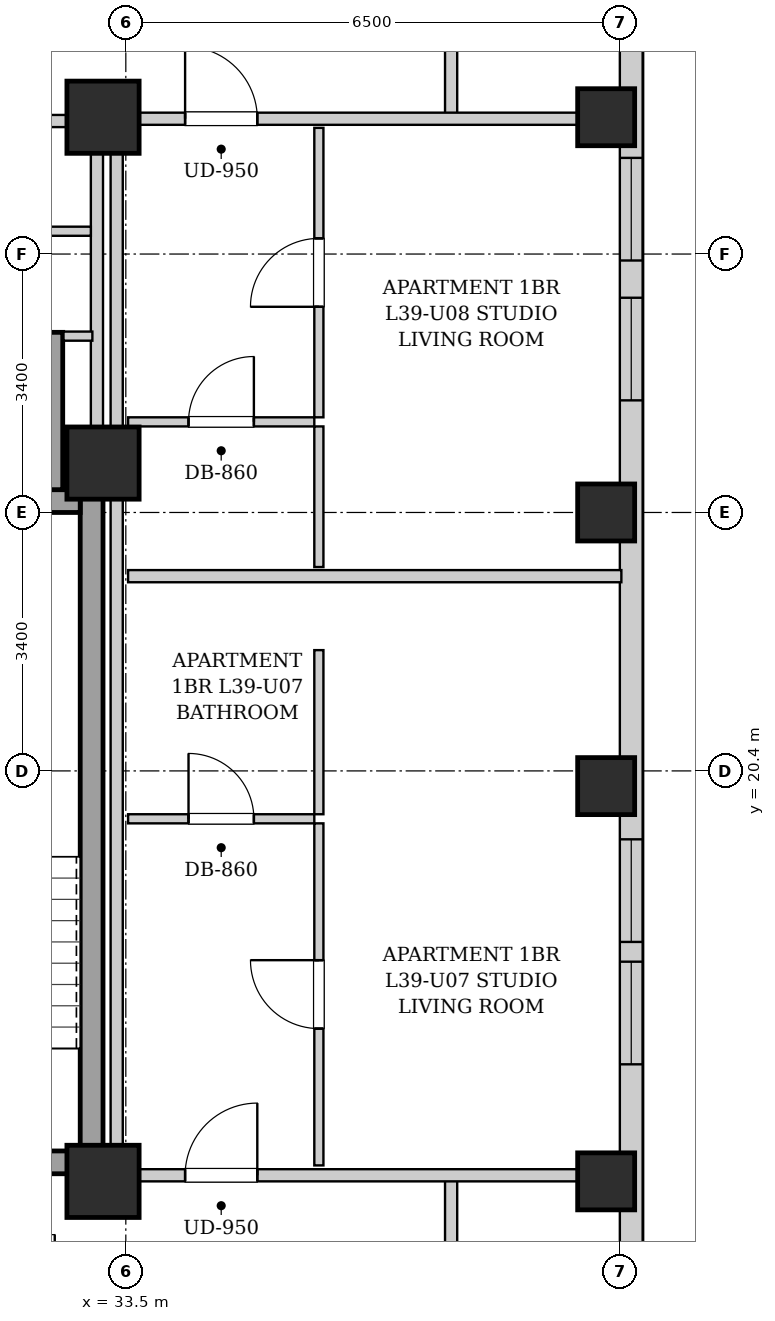
"""IFC4 building model, lengths in metres.
Left out: names, types, materials, properties, quantities, classifications, styles, units other than length and angle.
Written with IfcOpenShell. Run it as: python <this file> out.ifc"""

import sys

from ifc_helpers import new_model, si_unit, direction, frame, frame_2d, origin, origin_2d, place, context, subcontext, project, spatial, rectangle, extrude, element, fill, save


model = new_model("IFC4")
c1 = context("Model", 3, precision=1e-05, world=origin(), true_north=direction((0.0, 1.0)))
c2 = subcontext(c1, "Body", "Model", "MODEL_VIEW")
j1 = project(units=[si_unit("LENGTHUNIT", "METRE"), si_unit("PLANEANGLEUNIT", "RADIAN")], contexts=[c1])
p1 = place(None, origin())
s1 = spatial("IfcSite", under=j1, at=p1, CompositionType="ELEMENT")
p2 = place(p1, origin())
s2 = spatial("IfcBuilding", under=s1, at=p2, CompositionType="ELEMENT")
p3 = place(p2, frame((0.0, 0.0, 137.4)))
s3 = spatial("IfcBuildingStorey", under=s2, at=p3, CompositionType="ELEMENT", Elevation=137.4)
for number, where, z_axis, x_axis in (
    (1, (39.82, 15.0, 0.0), (0.0, 0.0, 1.0), (1.0, 0.0, 0.0)),
    (2, (39.82, 20.2, 0.0), (0.0, 0.0, 1.0), (1.0, 0.0, 0.0)),
    (3, (39.82, 23.8, 0.0), (0.0, 0.0, 1.0), (1.0, 0.0, 0.0)),
    (4, (39.82, 29.0, 0.0), (0.0, 0.0, 1.0), (1.0, 0.0, 0.0)),
):
    element("IfcColumn", number, at=place(p3, frame(where, z_axis=z_axis, x_axis=x_axis)), inside=s3, PredefinedType="COLUMN", context=c2, shape_type="SweptSolid", body=[
        extrude(rectangle(XDim=0.75, YDim=0.75, at=origin_2d()), origin(), (0.0, 0.0, 1.0), 3.25),
    ])
for number, where, z_axis, x_axis in (
    (5, (33.2, 15.0, 0.0), (0.0, 0.0, 1.0), (1.0, 0.0, 0.0)),
    (6, (33.2, 29.0, 0.0), (0.0, 0.0, 1.0), (1.0, 0.0, 0.0)),
    (7, (33.2, 24.45, 0.0), (0.0, 0.0, 1.0), (1.0, 0.0, 0.0)),
):
    element("IfcColumn", number, at=place(p3, frame(where, z_axis=z_axis, x_axis=x_axis)), inside=s3, PredefinedType="COLUMN", context=c2, shape_type="SweptSolid", body=[
        extrude(rectangle(XDim=0.95, YDim=0.95, at=origin_2d()), origin(), (0.0, 0.0, 1.0), 3.25),
    ])
p4 = place(p3, frame((40.15, 40.8, 0.0), z_axis=(0.0, 0.0, 1.0), x_axis=(0.0, -1.0, 0.0)))
e8 = element("IfcWall", 8, at=p4, inside=s3, PredefinedType="SOLIDWALL", context=c2, shape_type="SweptSolid", body=[
    extrude(rectangle(XDim=34.5, YDim=0.3, at=frame_2d((17.25, 0.0))), origin(), (0.0, 0.0, 1.0), 2.99),
])
p5 = place(p4, frame((31.725, 0.0, 0.55)))
e9 = element("IfcOpeningElement", 9, at=p5, cuts=e8, PredefinedType="OPENING", context=c2, shape_type="SweptSolid", body=[
    extrude(rectangle(XDim=1.35, YDim=1.2, at=frame_2d((0.675, 0.6))), frame((0.0, 0.16, 0.0), z_axis=(0.0, -1.0, 0.0), x_axis=(1.0, 0.0, 0.0)), (0.0, 0.0, 1.0), 0.32),
])
p6 = place(p4, frame((3.0, 0.0, 0.55)))
e10 = element("IfcOpeningElement", 10, at=p6, cuts=e8, PredefinedType="OPENING", context=c2, shape_type="SweptSolid", body=[
    extrude(rectangle(XDim=1.35, YDim=1.2, at=frame_2d((0.675, 0.6))), frame((0.0, 0.16, 0.0), z_axis=(0.0, -1.0, 0.0), x_axis=(1.0, 0.0, 0.0)), (0.0, 0.0, 1.0), 0.32),
])
p7 = place(p4, frame((1.085, 0.0, 0.55)))
e11 = element("IfcOpeningElement", 11, at=p7, cuts=e8, PredefinedType="OPENING", context=c2, shape_type="SweptSolid", body=[
    extrude(rectangle(XDim=1.35, YDim=1.2, at=frame_2d((0.675, 0.6))), frame((0.0, 0.16, 0.0), z_axis=(0.0, -1.0, 0.0), x_axis=(1.0, 0.0, 0.0)), (0.0, 0.0, 1.0), 0.32),
])
p8 = place(p4, frame((21.3, 0.0, 0.55)))
e12 = element("IfcOpeningElement", 12, at=p8, cuts=e8, PredefinedType="OPENING", context=c2, shape_type="SweptSolid", body=[
    extrude(rectangle(XDim=1.35, YDim=1.2, at=frame_2d((0.675, 0.6))), frame((0.0, 0.16, 0.0), z_axis=(0.0, -1.0, 0.0), x_axis=(1.0, 0.0, 0.0)), (0.0, 0.0, 1.0), 0.32),
])
p9 = place(p4, frame((22.91, 0.0, 0.55)))
e13 = element("IfcOpeningElement", 13, at=p9, cuts=e8, PredefinedType="OPENING", context=c2, shape_type="SweptSolid", body=[
    extrude(rectangle(XDim=1.35, YDim=1.2, at=frame_2d((0.675, 0.6))), frame((0.0, 0.16, 0.0), z_axis=(0.0, -1.0, 0.0), x_axis=(1.0, 0.0, 0.0)), (0.0, 0.0, 1.0), 0.32),
])
p10 = place(p4, frame((14.175, 0.0, 0.55)))
e14 = element("IfcOpeningElement", 14, at=p10, cuts=e8, PredefinedType="OPENING", context=c2, shape_type="SweptSolid", body=[
    extrude(rectangle(XDim=1.35, YDim=1.2, at=frame_2d((0.675, 0.6))), frame((0.0, 0.16, 0.0), z_axis=(0.0, -1.0, 0.0), x_axis=(1.0, 0.0, 0.0)), (0.0, 0.0, 1.0), 0.32),
])
p11 = place(p4, frame((12.335, 0.0, 0.55)))
e15 = element("IfcOpeningElement", 15, at=p11, cuts=e8, PredefinedType="OPENING", context=c2, shape_type="SweptSolid", body=[
    extrude(rectangle(XDim=1.35, YDim=1.2, at=frame_2d((0.675, 0.6))), frame((0.0, 0.16, 0.0), z_axis=(0.0, -1.0, 0.0), x_axis=(1.0, 0.0, 0.0)), (0.0, 0.0, 1.0), 0.32),
])
p12 = place(p3, frame((33.05, 15.1, 0.0), z_axis=(0.0, 0.0, 1.0), x_axis=(0.0, 1.0, 0.0)))
e16 = element("IfcWall", 16, at=p12, inside=s3, PredefinedType="SHEAR", context=c2, shape_type="SweptSolid", body=[
    extrude(rectangle(XDim=9.0, YDim=0.3, at=frame_2d((4.5, 0.0))), origin(), (0.0, 0.0, 1.0), 2.99),
])
p13 = place(p3, frame((30.05, 23.95, 0.0), z_axis=(0.0, 0.0, 1.0), x_axis=(1.0, 0.0, 0.0)))
e17 = element("IfcWall", 17, at=p13, inside=s3, PredefinedType="SHEAR", context=c2, shape_type="SweptSolid", body=[
    extrude(rectangle(XDim=2.85, YDim=0.3, at=frame_2d((1.425, 0.0))), origin(), (0.0, 0.0, 1.0), 2.99),
])
p14 = place(p3, frame((30.05, 15.25, 0.0), z_axis=(0.0, 0.0, 1.0), x_axis=(1.0, 0.0, 0.0)))
e18 = element("IfcWall", 18, at=p14, inside=s3, PredefinedType="SHEAR", context=c2, shape_type="SweptSolid", body=[
    extrude(rectangle(XDim=2.85, YDim=0.3, at=frame_2d((1.425, 0.0))), origin(), (0.0, 0.0, 1.0), 2.99),
])
p15 = place(p14, frame((0.86, 0.0, 0.0)))
e19 = element("IfcOpeningElement", 19, at=p15, cuts=e18, PredefinedType="OPENING", context=c2, shape_type="SweptSolid", body=[
    extrude(rectangle(XDim=1.1, YDim=2.05, at=frame_2d((0.55, 1.025))), frame((0.0, 0.16, 0.0), z_axis=(0.0, -1.0, 0.0), x_axis=(1.0, 0.0, 0.0)), (0.0, 0.0, 1.0), 0.32),
])
p16 = place(p3, frame((32.56, 24.1, 0.0), z_axis=(0.0, 0.0, 1.0), x_axis=(0.0, 1.0, 0.0)))
e20 = element("IfcWall", 20, at=p16, inside=s3, PredefinedType="SHEAR", context=c2, shape_type="SweptSolid", body=[
    extrude(rectangle(XDim=2.07, YDim=0.22, at=frame_2d((1.035, 0.0))), origin(), (0.0, 0.0, 1.0), 2.99),
])
p17 = place(p3, frame((33.12, 24.12, 0.0), z_axis=(0.0, 0.0, 1.0), x_axis=(0.0, 1.0, 0.0)))
e21 = element("IfcWall", 21, at=p17, inside=s3, PredefinedType="PARTITIONING", context=c2, shape_type="SweptSolid", body=[
    extrude(rectangle(XDim=4.76, YDim=0.16, at=frame_2d((2.38, 0.0))), origin(), (0.0, 0.0, 1.0), 2.325),
])
p18 = place(p3, frame((32.68, 26.12, 0.0), z_axis=(0.0, 0.0, 1.0), x_axis=(1.0, 0.0, 0.0)))
e22 = element("IfcWall", 22, at=p18, inside=s3, PredefinedType="PARTITIONING", context=c2, shape_type="SweptSolid", body=[
    extrude(rectangle(XDim=0.38, YDim=0.12, at=frame_2d((0.19, 0.0))), origin(), (0.0, 0.0, 1.0), 2.99),
])
p19 = place(p3, frame((30.12, 27.5, 0.0), z_axis=(0.0, 0.0, 1.0), x_axis=(1.0, 0.0, 0.0)))
e23 = element("IfcWall", 23, at=p19, inside=s3, PredefinedType="PARTITIONING", context=c2, shape_type="SweptSolid", body=[
    extrude(rectangle(XDim=2.92, YDim=0.12, at=frame_2d((1.46, 0.0))), origin(), (0.0, 0.0, 1.0), 2.99),
])
p20 = place(p19, frame((0.97, 0.0, 0.0)))
e24 = element("IfcOpeningElement", 24, at=p20, cuts=e23, PredefinedType="OPENING", context=c2, shape_type="SweptSolid", body=[
    extrude(rectangle(XDim=0.86, YDim=2.05, at=frame_2d((0.43, 1.025))), frame((0.0, 0.07, 0.0), z_axis=(0.0, -1.0, 0.0), x_axis=(1.0, 0.0, 0.0)), (0.0, 0.0, 1.0), 0.14),
])
p21 = place(p3, frame((25.72, 28.95, 0.0), z_axis=(0.0, 0.0, 1.0), x_axis=(1.0, 0.0, 0.0)))
e25 = element("IfcWall", 25, at=p21, inside=s3, PredefinedType="PARTITIONING", context=c2, shape_type="SweptSolid", body=[
    extrude(rectangle(XDim=7.32, YDim=0.16, at=frame_2d((3.66, 0.0))), origin(), (0.0, 0.0, 1.0), 2.426),
])
p22 = place(p21, frame((1.27, 0.0, 0.0)))
e26 = element("IfcOpeningElement", 26, at=p22, cuts=e25, PredefinedType="OPENING", context=c2, shape_type="SweptSolid", body=[
    extrude(rectangle(XDim=0.86, YDim=2.05, at=frame_2d((0.43, 1.025))), frame((0.0, 0.09, 0.0), z_axis=(0.0, -1.0, 0.0), x_axis=(1.0, 0.0, 0.0)), (0.0, 0.0, 1.0), 0.18),
])
for number, where, z_axis, x_axis in (
    (27, (37.78, 13.35, 0.0), (0.0, 0.0, 1.0), (0.0, 1.0, 0.0)),
    (28, (37.78, 28.98, 0.0), (0.0, 0.0, 1.0), (0.0, 1.0, 0.0)),
):
    element("IfcWall", number, at=place(p3, frame(where, z_axis=z_axis, x_axis=x_axis)), inside=s3, PredefinedType="PARTITIONING", context=c2, shape_type="SweptSolid", body=[
        extrude(rectangle(XDim=1.74, YDim=0.16, at=frame_2d((0.87, 0.0))), origin(), (0.0, 0.0, 1.0), 2.99),
    ])
p23 = place(p3, frame((33.38, 15.08, 0.0), z_axis=(0.0, 0.0, 1.0), x_axis=(1.0, 0.0, 0.0)))
e29 = element("IfcWall", 29, at=p23, inside=s3, PredefinedType="PARTITIONING", context=c2, shape_type="SweptSolid", body=[
    extrude(rectangle(XDim=6.64, YDim=0.16, at=frame_2d((3.32, 0.0))), origin(), (0.0, 0.0, 1.0), 2.426),
])
p24 = place(p23, frame((0.9, 0.0, 0.0)))
e30 = element("IfcOpeningElement", 30, at=p24, cuts=e29, PredefinedType="OPENING", context=c2, shape_type="SweptSolid", body=[
    extrude(rectangle(XDim=0.95, YDim=2.1, at=frame_2d((0.475, 1.05))), frame((0.0, 0.09, 0.0), z_axis=(0.0, -1.0, 0.0), x_axis=(1.0, 0.0, 0.0)), (0.0, 0.0, 1.0), 0.18),
])
p25 = place(p3, frame((33.53, 22.962, 0.0), z_axis=(0.0, 0.0, 1.0), x_axis=(1.0, 0.0, 0.0)))
e31 = element("IfcWall", 31, at=p25, inside=s3, PredefinedType="PARTITIONING", context=c2, shape_type="SweptSolid", body=[
    extrude(rectangle(XDim=6.49, YDim=0.16, at=frame_2d((3.245, 0.0))), origin(), (0.0, 0.0, 1.0), 2.99),
])
p26 = place(p3, frame((33.53, 19.77, 0.0), z_axis=(0.0, 0.0, 1.0), x_axis=(1.0, 0.0, 0.0)))
e32 = element("IfcWall", 32, at=p26, inside=s3, PredefinedType="PARTITIONING", context=c2, shape_type="SweptSolid", body=[
    extrude(rectangle(XDim=2.45, YDim=0.12, at=frame_2d((1.225, 0.0))), origin(), (0.0, 0.0, 1.0), 2.99),
])
p27 = place(p26, frame((0.795, 0.0, 0.0)))
e33 = element("IfcOpeningElement", 33, at=p27, cuts=e32, PredefinedType="OPENING", context=c2, shape_type="SweptSolid", body=[
    extrude(rectangle(XDim=0.86, YDim=2.05, at=frame_2d((0.43, 1.025))), frame((0.0, 0.07, 0.0), z_axis=(0.0, -1.0, 0.0), x_axis=(1.0, 0.0, 0.0)), (0.0, 0.0, 1.0), 0.14),
])
p28 = place(p3, frame((36.04, 19.83, 0.0), z_axis=(0.0, 0.0, 1.0), x_axis=(0.0, 1.0, 0.0)))
e34 = element("IfcWall", 34, at=p28, inside=s3, PredefinedType="PARTITIONING", context=c2, shape_type="SweptSolid", body=[
    extrude(rectangle(XDim=2.159, YDim=0.12, at=frame_2d((1.08, 0.0))), origin(), (0.0, 0.0, 1.0), 2.99),
])
p29 = place(p3, frame((36.04, 15.21, 0.0), z_axis=(0.0, 0.0, 1.0), x_axis=(0.0, 1.0, 0.0)))
e35 = element("IfcWall", 35, at=p29, inside=s3, PredefinedType="PARTITIONING", context=c2, shape_type="SweptSolid", body=[
    extrude(rectangle(XDim=4.5, YDim=0.12, at=frame_2d((2.25, 0.0))), origin(), (0.0, 0.0, 1.0), 2.99),
])
p30 = place(p29, frame((1.8, 0.0, 0.0)))
e36 = element("IfcOpeningElement", 36, at=p30, cuts=e35, PredefinedType="OPENING", context=c2, shape_type="SweptSolid", body=[
    extrude(rectangle(XDim=0.9, YDim=2.05, at=frame_2d((0.45, 1.025))), frame((0.0, 0.07, 0.0), z_axis=(0.0, -1.0, 0.0), x_axis=(1.0, 0.0, 0.0)), (0.0, 0.0, 1.0), 0.14),
])
p31 = place(p3, frame((33.38, 28.98, 0.0), z_axis=(0.0, 0.0, 1.0), x_axis=(1.0, 0.0, 0.0)))
e37 = element("IfcWall", 37, at=p31, inside=s3, PredefinedType="PARTITIONING", context=c2, shape_type="SweptSolid", body=[
    extrude(rectangle(XDim=6.64, YDim=0.16, at=frame_2d((3.32, 0.0))), origin(), (0.0, 0.0, 1.0), 2.426),
])
p32 = place(p31, frame((0.9, 0.0, 0.0)))
e38 = element("IfcOpeningElement", 38, at=p32, cuts=e37, PredefinedType="OPENING", context=c2, shape_type="SweptSolid", body=[
    extrude(rectangle(XDim=0.95, YDim=2.1, at=frame_2d((0.475, 1.05))), frame((0.0, 0.09, 0.0), z_axis=(0.0, -1.0, 0.0), x_axis=(1.0, 0.0, 0.0)), (0.0, 0.0, 1.0), 0.18),
])
p33 = place(p3, frame((33.53, 24.992, 0.0), z_axis=(0.0, 0.0, 1.0), x_axis=(1.0, 0.0, 0.0)))
e39 = element("IfcWall", 39, at=p33, inside=s3, PredefinedType="PARTITIONING", context=c2, shape_type="SweptSolid", body=[
    extrude(rectangle(XDim=2.45, YDim=0.12, at=frame_2d((1.225, 0.0))), origin(), (0.0, 0.0, 1.0), 2.99),
])
p34 = place(p33, frame((0.795, 0.0, 0.0)))
e40 = element("IfcOpeningElement", 40, at=p34, cuts=e39, PredefinedType="OPENING", context=c2, shape_type="SweptSolid", body=[
    extrude(rectangle(XDim=0.86, YDim=2.05, at=frame_2d((0.43, 1.025))), frame((0.0, 0.07, 0.0), z_axis=(0.0, -1.0, 0.0), x_axis=(1.0, 0.0, 0.0)), (0.0, 0.0, 1.0), 0.14),
])
p35 = place(p3, frame((36.04, 23.082, 0.0), z_axis=(0.0, 0.0, 1.0), x_axis=(0.0, 1.0, 0.0)))
e41 = element("IfcWall", 41, at=p35, inside=s3, PredefinedType="PARTITIONING", context=c2, shape_type="SweptSolid", body=[
    extrude(rectangle(XDim=1.85, YDim=0.12, at=frame_2d((0.925, 0.0))), origin(), (0.0, 0.0, 1.0), 2.99),
])
p36 = place(p3, frame((36.04, 25.052, 0.0), z_axis=(0.0, 0.0, 1.0), x_axis=(0.0, 1.0, 0.0)))
e42 = element("IfcWall", 42, at=p36, inside=s3, PredefinedType="PARTITIONING", context=c2, shape_type="SweptSolid", body=[
    extrude(rectangle(XDim=3.808, YDim=0.12, at=frame_2d((1.904, 0.0))), origin(), (0.0, 0.0, 1.0), 2.99),
])
p37 = place(p36, frame((1.454, 0.0, 0.0)))
e43 = element("IfcOpeningElement", 43, at=p37, cuts=e42, PredefinedType="OPENING", context=c2, shape_type="SweptSolid", body=[
    extrude(rectangle(XDim=0.9, YDim=2.05, at=frame_2d((0.45, 1.025))), frame((0.0, 0.07, 0.0), z_axis=(0.0, -1.0, 0.0), x_axis=(1.0, 0.0, 0.0)), (0.0, 0.0, 1.0), 0.14),
])
p38 = place(p3, frame((33.38, 15.02, 0.0), z_axis=(0.0, 0.0, 1.0), x_axis=(0.0, 1.0, 0.0)))
e44 = element("IfcWall", 44, at=p38, inside=s3, PredefinedType="PARTITIONING", context=c2, shape_type="SweptSolid", body=[
    extrude(rectangle(XDim=13.98, YDim=0.16, at=frame_2d((6.99, 0.0))), origin(), (0.0, 0.0, 1.0), 2.325),
])
p39 = place(p24, origin())
e45 = element("IfcDoor", 45, at=p39, inside=s3, OperationType="SINGLE_SWING_RIGHT", PredefinedType="DOOR", context=c2, shape_type="SweptSolid", body=[
    extrude(rectangle(XDim=0.95, YDim=2.1, at=frame_2d((0.475, 1.05))), frame((0.0, 0.025, 0.0), z_axis=(0.0, -1.0, 0.0), x_axis=(1.0, 0.0, 0.0)), (0.0, 0.0, 1.0), 0.05),
])
fill(e30, e45)
p40 = place(p27, origin())
e46 = element("IfcDoor", 46, at=p40, inside=s3, OperationType="SINGLE_SWING_LEFT", PredefinedType="DOOR", context=c2, shape_type="SweptSolid", body=[
    extrude(rectangle(XDim=0.86, YDim=2.05, at=frame_2d((0.43, 1.025))), frame((0.0, 0.025, 0.0), z_axis=(0.0, -1.0, 0.0), x_axis=(1.0, 0.0, 0.0)), (0.0, 0.0, 1.0), 0.05),
])
fill(e33, e46)
p41 = place(p30, origin())
e47 = element("IfcDoor", 47, at=p41, inside=s3, OperationType="SINGLE_SWING_RIGHT", PredefinedType="DOOR", context=c2, shape_type="SweptSolid", body=[
    extrude(rectangle(XDim=0.9, YDim=2.05, at=frame_2d((0.45, 1.025))), frame((0.0, 0.025, 0.0), z_axis=(0.0, -1.0, 0.0), x_axis=(1.0, 0.0, 0.0)), (0.0, 0.0, 1.0), 0.05),
])
fill(e36, e47)
p42 = place(p32, origin())
e48 = element("IfcDoor", 48, at=p42, inside=s3, OperationType="SINGLE_SWING_LEFT", PredefinedType="DOOR", context=c2, shape_type="SweptSolid", body=[
    extrude(rectangle(XDim=0.95, YDim=2.1, at=frame_2d((0.475, 1.05))), frame((0.0, 0.025, 0.0), z_axis=(0.0, -1.0, 0.0), x_axis=(1.0, 0.0, 0.0)), (0.0, 0.0, 1.0), 0.05),
])
fill(e38, e48)
p43 = place(p34, origin())
e49 = element("IfcDoor", 49, at=p43, inside=s3, OperationType="SINGLE_SWING_RIGHT", PredefinedType="DOOR", context=c2, shape_type="SweptSolid", body=[
    extrude(rectangle(XDim=0.86, YDim=2.05, at=frame_2d((0.43, 1.025))), frame((0.0, 0.025, 0.0), z_axis=(0.0, -1.0, 0.0), x_axis=(1.0, 0.0, 0.0)), (0.0, 0.0, 1.0), 0.05),
])
fill(e40, e49)
p44 = place(p37, origin())
e50 = element("IfcDoor", 50, at=p44, inside=s3, OperationType="SINGLE_SWING_LEFT", PredefinedType="DOOR", context=c2, shape_type="SweptSolid", body=[
    extrude(rectangle(XDim=0.9, YDim=2.05, at=frame_2d((0.45, 1.025))), frame((0.0, 0.025, 0.0), z_axis=(0.0, -1.0, 0.0), x_axis=(1.0, 0.0, 0.0)), (0.0, 0.0, 1.0), 0.05),
])
fill(e43, e50)
p45 = place(p8, origin())
e51 = element("IfcWindow", 51, at=p45, inside=s3, PartitioningType="SINGLE_PANEL", PredefinedType="WINDOW", context=c2, shape_type="SweptSolid", body=[
    extrude(rectangle(XDim=1.35, YDim=1.2, at=frame_2d((0.675, 0.6))), frame((0.0, 0.03, 0.0), z_axis=(0.0, -1.0, 0.0), x_axis=(1.0, 0.0, 0.0)), (0.0, 0.0, 1.0), 0.06),
])
fill(e12, e51)
p46 = place(p9, origin())
e52 = element("IfcWindow", 52, at=p46, inside=s3, PartitioningType="SINGLE_PANEL", PredefinedType="WINDOW", context=c2, shape_type="SweptSolid", body=[
    extrude(rectangle(XDim=1.35, YDim=1.2, at=frame_2d((0.675, 0.6))), frame((0.0, 0.03, 0.0), z_axis=(0.0, -1.0, 0.0), x_axis=(1.0, 0.0, 0.0)), (0.0, 0.0, 1.0), 0.06),
])
fill(e13, e52)
p47 = place(p10, origin())
e53 = element("IfcWindow", 53, at=p47, inside=s3, PartitioningType="SINGLE_PANEL", PredefinedType="WINDOW", context=c2, shape_type="SweptSolid", body=[
    extrude(rectangle(XDim=1.35, YDim=1.2, at=frame_2d((0.675, 0.6))), frame((0.0, 0.03, 0.0), z_axis=(0.0, -1.0, 0.0), x_axis=(1.0, 0.0, 0.0)), (0.0, 0.0, 1.0), 0.06),
])
fill(e14, e53)
p48 = place(p11, origin())
e54 = element("IfcWindow", 54, at=p48, inside=s3, PartitioningType="SINGLE_PANEL", PredefinedType="WINDOW", context=c2, shape_type="SweptSolid", body=[
    extrude(rectangle(XDim=1.35, YDim=1.2, at=frame_2d((0.675, 0.6))), frame((0.0, 0.03, 0.0), z_axis=(0.0, -1.0, 0.0), x_axis=(1.0, 0.0, 0.0)), (0.0, 0.0, 1.0), 0.06),
])
fill(e15, e54)
save(model, sys.argv[1])
